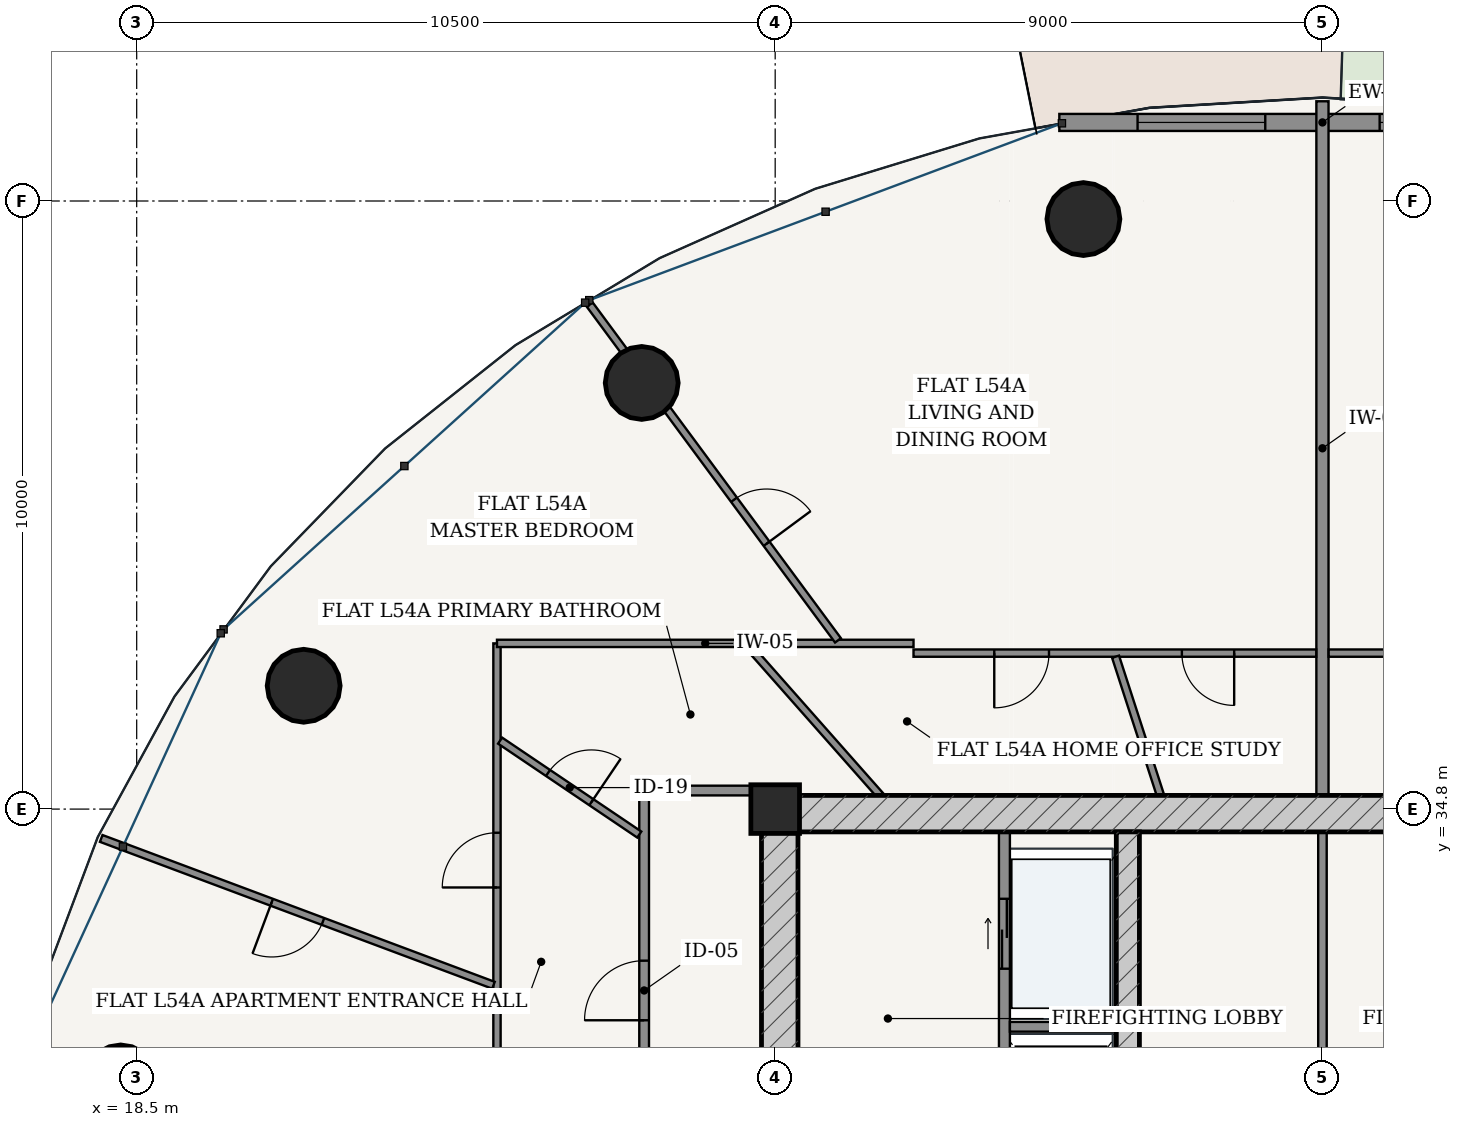
"""IFC4 building model, lengths in metres.
Left out: names, types, materials, properties, quantities, classifications, styles, units other than length and angle.
Written with IfcOpenShell. Run it as: python <this file> out.ifc"""

import sys

from ifc_helpers import new_model, si_unit, direction, frame, frame_2d, origin, origin_2d, place, context, subcontext, project, spatial, rectangle, hollow_circle, extrude, source, transform, mapped, element, fill, save


model = new_model("IFC4")
c1 = context("Model", 3, precision=1e-05, world=origin(), true_north=direction((-0.2419218956, 0.970295726276)))
c2 = subcontext(c1, "Body", "Model", "MODEL_VIEW")
j1 = project(units=[si_unit("LENGTHUNIT", "METRE"), si_unit("PLANEANGLEUNIT", "RADIAN")], contexts=[c1])
p1 = place(None, origin())
s1 = spatial("IfcSite", under=j1, at=p1, CompositionType="ELEMENT")
p2 = place(p1, origin())
s2 = spatial("IfcBuilding", under=s1, at=p2, CompositionType="ELEMENT")
p3 = place(p2, frame((0.0, 0.0, 206.0)))
s3 = spatial("IfcBuildingStorey", under=s2, at=p3, CompositionType="ELEMENT", Elevation=206.0)
p4 = place(p3, frame((29.0, 34.8, 0.0), z_axis=(0.0, 0.0, 1.0), x_axis=(1.0, 0.0, 0.0)))
e1 = element("IfcColumn", 1, at=p4, inside=s3, PredefinedType="COLUMN", context=c2, shape_type="SweptSolid", body=[
    extrude(rectangle(XDim=0.8, YDim=0.8, at=origin_2d()), origin(), (0.0, 0.0, 1.0), 3.7),
])
p5 = place(p3, frame((28.775, 34.725, 0.0), z_axis=(0.0, 0.0, 1.0), x_axis=(1.0, 0.0, 0.0)))
e2 = element("IfcWall", 2, at=p5, inside=s3, PredefinedType="SHEAR", context=c2, shape_type="SweptSolid", body=[
    extrude(rectangle(XDim=18.45, YDim=0.6, at=frame_2d((9.225, 0.0))), origin(), (0.0, 0.0, 1.0), 3.435),
])
p6 = place(p3, frame((29.075, 19.175, 0.0), z_axis=(0.0, 0.0, 1.0), x_axis=(0.0, 1.0, 0.0)))
e3 = element("IfcWall", 3, at=p6, inside=s3, PredefinedType="SHEAR", context=c2, shape_type="SweptSolid", body=[
    extrude(rectangle(XDim=15.25, YDim=0.6, at=frame_2d((7.625, 0.0))), origin(), (0.0, 0.0, 1.0), 3.435),
])
p7 = place(p6, frame((9.875, 0.0, 0.0)))
e4 = element("IfcOpeningElement", 4, at=p7, cuts=e3, PredefinedType="OPENING", context=c2, shape_type="SweptSolid", body=[
    extrude(rectangle(XDim=1.5, YDim=2.2, at=frame_2d((0.75, 1.1))), frame((0.0, 0.31, 0.0), z_axis=(0.0, -1.0, 0.0), x_axis=(1.0, 0.0, 0.0)), (0.0, 0.0, 1.0), 0.62),
])
p8 = place(p3, frame((34.8, 19.175, 0.0), z_axis=(0.0, 0.0, 1.0), x_axis=(0.0, 1.0, 0.0)))
e5 = element("IfcWall", 5, at=p8, inside=s3, PredefinedType="SHEAR", context=c2, shape_type="SweptSolid", body=[
    extrude(rectangle(XDim=15.25, YDim=0.38, at=frame_2d((7.625, 0.0))), origin(), (0.0, 0.0, 1.0), 3.435),
])
p9 = place(p8, frame((7.8, 0.0, 0.0)))
e6 = element("IfcOpeningElement", 6, at=p9, cuts=e5, PredefinedType="OPENING", context=c2, shape_type="SweptSolid", body=[
    extrude(rectangle(XDim=1.05, YDim=2.15, at=frame_2d((0.525, 1.075))), frame((0.0, 0.2, 0.0), z_axis=(0.0, -1.0, 0.0), x_axis=(1.0, 0.0, 0.0)), (0.0, 0.0, 1.0), 0.4),
])
for number, where, z_axis, x_axis in (
    (7, (34.069, 44.503, 0.0), (0.0, 0.0, 1.0), (1.0, 0.0, 0.0)),
    (8, (26.805, 41.808, 0.0), (0.0, 0.0, 1.0), (1.0, 0.0, 0.0)),
    (9, (21.246, 36.828, 0.0), (0.0, 0.0, 1.0), (1.0, 0.0, 0.0)),
    (10, (18.237, 30.321, 0.0), (0.0, 0.0, 1.0), (1.0, 0.0, 0.0)),
):
    element("IfcColumn", number, at=place(p3, frame(where, z_axis=z_axis, x_axis=x_axis)), inside=s3, PredefinedType="COLUMN", context=c2, shape_type="SweptSolid", body=[
        extrude(hollow_circle(Radius=0.6, WallThickness=0.038, at=origin_2d()), origin(), (0.0, 0.0, 1.0), 3.7),
    ])
p10 = place(p3, frame((42.327, 46.092, 0.0), z_axis=(0.0, 0.0, 1.0), x_axis=(-1.0, 0.0, 0.0)))
e11 = element("IfcWall", 11, at=p10, inside=s3, PredefinedType="SOLIDWALL", context=c2, shape_type="SweptSolid", body=[
    extrude(rectangle(XDim=8.654, YDim=0.28, at=frame_2d((4.327, 0.0))), origin(), (0.0, 0.0, 1.0), 3.435),
])
p11 = place(p10, frame((1.287, 0.0, 0.85)))
e12 = element("IfcOpeningElement", 12, at=p11, cuts=e11, PredefinedType="OPENING", context=c2, shape_type="SweptSolid", body=[
    extrude(rectangle(XDim=2.1, YDim=1.95, at=frame_2d((1.05, 0.975))), frame((0.0, 0.15, 0.0), z_axis=(0.0, -1.0, 0.0), x_axis=(1.0, 0.0, 0.0)), (0.0, 0.0, 1.0), 0.3),
])
p12 = place(p10, frame((5.268, 0.0, 0.85)))
e13 = element("IfcOpeningElement", 13, at=p12, cuts=e11, PredefinedType="OPENING", context=c2, shape_type="SweptSolid", body=[
    extrude(rectangle(XDim=2.1, YDim=1.95, at=frame_2d((1.05, 0.975))), frame((0.0, 0.15, 0.0), z_axis=(0.0, -1.0, 0.0), x_axis=(1.0, 0.0, 0.0)), (0.0, 0.0, 1.0), 0.3),
])
p13 = place(p3, frame((32.77, 28.52, 0.0), z_axis=(0.0, 0.0, 1.0), x_axis=(0.0, 1.0, 0.0)))
e14 = element("IfcWall", 14, at=p13, inside=s3, PredefinedType="PARTITIONING", context=c2, shape_type="SweptSolid", body=[
    extrude(rectangle(XDim=5.905, YDim=0.18, at=frame_2d((2.953, 0.0))), origin(), (0.0, 0.0, 1.0), 3.435),
])
p14 = place(p13, frame((3.655, 0.0, 0.0)))
e15 = element("IfcOpeningElement", 15, at=p14, cuts=e14, PredefinedType="OPENING", context=c2, shape_type="SweptSolid", body=[
    extrude(rectangle(XDim=1.15, YDim=2.2, at=frame_2d((0.575, 1.1))), frame((0.0, 0.1, 0.0), z_axis=(0.0, -1.0, 0.0), x_axis=(1.0, 0.0, 0.0)), (0.0, 0.0, 1.0), 0.2),
])
p15 = place(p13, frame((0.73, 0.0, 0.0)))
e16 = element("IfcOpeningElement", 16, at=p15, cuts=e14, PredefinedType="OPENING", context=c2, shape_type="SweptSolid", body=[
    extrude(rectangle(XDim=1.2, YDim=2.25, at=frame_2d((0.6, 1.125))), frame((0.0, 0.1, 0.0), z_axis=(0.0, -1.0, 0.0), x_axis=(1.0, 0.0, 0.0)), (0.0, 0.0, 1.0), 0.2),
])
p16 = place(p3, frame((32.86, 31.22, 0.0), z_axis=(0.0, 0.0, 1.0), x_axis=(1.0, 0.0, 0.0)))
e17 = element("IfcWall", 17, at=p16, inside=s3, PredefinedType="PARTITIONING", context=c2, shape_type="SweptSolid", body=[
    extrude(rectangle(XDim=1.75, YDim=0.16, at=frame_2d((0.875, 0.0))), origin(), (0.0, 0.0, 1.0), 3.435),
])
p17 = place(p3, frame((38.0, 28.56, 0.0), z_axis=(0.0, 0.0, 1.0), x_axis=(0.0, 1.0, 0.0)))
e18 = element("IfcWall", 18, at=p17, inside=s3, PredefinedType="PARTITIONING", context=c2, shape_type="SweptSolid", body=[
    extrude(rectangle(XDim=5.865, YDim=0.14, at=frame_2d((2.933, 0.0))), origin(), (0.0, 0.0, 1.0), 3.435),
])
p18 = place(p3, frame((26.845, 24.4, 0.0), z_axis=(0.0, 0.0, 1.0), x_axis=(0.0, 1.0, 0.0)))
e19 = element("IfcWall", 19, at=p18, inside=s3, PredefinedType="PARTITIONING", context=c2, shape_type="SweptSolid", body=[
    extrude(rectangle(XDim=10.625, YDim=0.16, at=frame_2d((5.312, 0.0))), origin(), (0.0, 0.0, 1.0), 2.951),
])
p19 = place(p18, frame((6.927, 0.0, 0.0)))
e20 = element("IfcOpeningElement", 20, at=p19, cuts=e19, PredefinedType="OPENING", context=c2, shape_type="SweptSolid", body=[
    extrude(rectangle(XDim=0.98, YDim=2.2, at=frame_2d((0.49, 1.1))), frame((0.0, 0.09, 0.0), z_axis=(0.0, -1.0, 0.0), x_axis=(1.0, 0.0, 0.0)), (0.0, 0.0, 1.0), 0.18),
])
p20 = place(p3, frame((26.845, 35.105, 0.0), z_axis=(0.0, 0.0, 1.0), x_axis=(1.0, 0.0, 0.0)))
e21 = element("IfcWall", 21, at=p20, inside=s3, PredefinedType="PARTITIONING", context=c2, shape_type="SweptSolid", body=[
    extrude(rectangle(XDim=1.93, YDim=0.16, at=frame_2d((0.965, 0.0))), origin(), (0.0, 0.0, 1.0), 3.435),
])
p21 = place(p3, frame((38.0, 35.027, 0.0), z_axis=(0.0, 0.0, 1.0), x_axis=(0.0, 1.0, 0.0)))
e22 = element("IfcWall", 22, at=p21, inside=s3, PredefinedType="PARTITIONING", context=c2, shape_type="SweptSolid", body=[
    extrude(rectangle(XDim=11.413, YDim=0.2, at=frame_2d((5.707, 0.0))), origin(), (0.0, 0.0, 1.0), 2.52),
])
p22 = place(p3, frame((24.425, 21.9, 0.0), z_axis=(0.0, 0.0, 1.0), x_axis=(0.0, 1.0, 0.0)))
e23 = element("IfcWall", 23, at=p22, inside=s3, PredefinedType="PARTITIONING", context=c2, shape_type="SweptSolid", body=[
    extrude(rectangle(XDim=15.625, YDim=0.12, at=frame_2d((7.812, 0.0))), origin(), (0.0, 0.0, 1.0), 2.951),
])
p23 = place(p22, frame((11.611, 0.0, 0.0)))
e24 = element("IfcOpeningElement", 24, at=p23, cuts=e23, PredefinedType="OPENING", context=c2, shape_type="SweptSolid", body=[
    extrude(rectangle(XDim=0.9, YDim=2.15, at=frame_2d((0.45, 1.075))), frame((0.0, 0.07, 0.0), z_axis=(0.0, -1.0, 0.0), x_axis=(1.0, 0.0, 0.0)), (0.0, 0.0, 1.0), 0.14),
])
p24 = place(p3, frame((24.425, 37.525, 0.0), z_axis=(0.0, 0.0, 1.0), x_axis=(1.0, 0.0, 0.0)))
e25 = element("IfcWall", 25, at=p24, inside=s3, PredefinedType="PARTITIONING", context=c2, shape_type="SweptSolid", body=[
    extrude(rectangle(XDim=6.85, YDim=0.12, at=frame_2d((3.425, 0.0))), origin(), (0.0, 0.0, 1.0), 2.951),
])
p25 = place(p3, frame((31.275, 37.365, 0.0), z_axis=(0.0, 0.0, 1.0), x_axis=(1.0, 0.0, 0.0)))
e26 = element("IfcWall", 26, at=p25, inside=s3, PredefinedType="PARTITIONING", context=c2, shape_type="SweptSolid", body=[
    extrude(rectangle(XDim=6.623, YDim=0.12, at=frame_2d((3.312, 0.0))), origin(), (0.0, 0.0, 1.0), 2.951),
])
p26 = place(p25, frame((4.413, 0.0, 0.0)))
e27 = element("IfcOpeningElement", 27, at=p26, cuts=e26, PredefinedType="OPENING", context=c2, shape_type="SweptSolid", body=[
    extrude(rectangle(XDim=0.86, YDim=2.15, at=frame_2d((0.43, 1.075))), frame((0.0, 0.07, 0.0), z_axis=(0.0, -1.0, 0.0), x_axis=(1.0, 0.0, 0.0)), (0.0, 0.0, 1.0), 0.14),
])
p27 = place(p25, frame((1.328, 0.0, 0.0)))
e28 = element("IfcOpeningElement", 28, at=p27, cuts=e26, PredefinedType="OPENING", context=c2, shape_type="SweptSolid", body=[
    extrude(rectangle(XDim=0.9, YDim=2.15, at=frame_2d((0.45, 1.075))), frame((0.0, 0.07, 0.0), z_axis=(0.0, -1.0, 0.0), x_axis=(1.0, 0.0, 0.0)), (0.0, 0.0, 1.0), 0.14),
])
p28 = place(p3, frame((30.033, 37.575, 0.0), z_axis=(0.0, 0.0, 1.0), x_axis=(-0.59452500855, 0.804077119565, 0.0)))
e29 = element("IfcWall", 29, at=p28, inside=s3, PredefinedType="PARTITIONING", context=c2, shape_type="SweptSolid", body=[
    extrude(rectangle(XDim=6.867, YDim=0.12, at=frame_2d((3.434, 0.0))), origin(), (0.0, 0.0, 1.0), 2.951),
])
p29 = place(p28, frame((1.976, 0.0, 0.0)))
e30 = element("IfcOpeningElement", 30, at=p29, cuts=e29, PredefinedType="OPENING", context=c2, shape_type="SweptSolid", body=[
    extrude(rectangle(XDim=0.9, YDim=2.15, at=frame_2d((0.45, 1.075))), frame((0.0, 0.07, 0.0), z_axis=(0.0, -1.0, 0.0), x_axis=(1.0, 0.0, 0.0)), (0.0, 0.0, 1.0), 0.14),
])
p30 = place(p3, frame((24.367, 31.903, 0.0), z_axis=(0.0, 0.0, 1.0), x_axis=(-0.936544604529, 0.350548432785, 0.0)))
e31 = element("IfcWall", 31, at=p30, inside=s3, PredefinedType="PARTITIONING", context=c2, shape_type="SweptSolid", body=[
    extrude(rectangle(XDim=6.887, YDim=0.12, at=frame_2d((3.444, 0.0))), origin(), (0.0, 0.0, 1.0), 2.951),
])
p31 = place(p30, frame((2.994, 0.0, 0.0)))
e32 = element("IfcOpeningElement", 32, at=p31, cuts=e31, PredefinedType="OPENING", context=c2, shape_type="SweptSolid", body=[
    extrude(rectangle(XDim=0.9, YDim=2.15, at=frame_2d((0.45, 1.075))), frame((0.0, 0.07, 0.0), z_axis=(0.0, -1.0, 0.0), x_axis=(1.0, 0.0, 0.0)), (0.0, 0.0, 1.0), 0.14),
])
p32 = place(p3, frame((35.336, 35.027, 0.0), z_axis=(0.0, 0.0, 1.0), x_axis=(-0.308083476138, 0.951359328398, 0.0)))
e33 = element("IfcWall", 33, at=p32, inside=s3, PredefinedType="PARTITIONING", context=c2, shape_type="SweptSolid", body=[
    extrude(rectangle(XDim=2.396, YDim=0.12, at=frame_2d((1.198, 0.0))), origin(), (0.0, 0.0, 1.0), 2.52),
])
p33 = place(p3, frame((30.726, 35.027, 0.0), z_axis=(0.0, 0.0, 1.0), x_axis=(-0.662398427862, 0.749151735475, 0.0)))
e34 = element("IfcWall", 34, at=p33, inside=s3, PredefinedType="PARTITIONING", context=c2, shape_type="SweptSolid", body=[
    extrude(rectangle(XDim=3.273, YDim=0.12, at=frame_2d((1.636, 0.0))), origin(), (0.0, 0.0, 1.0), 3.435),
])
p34 = place(p3, frame((26.765, 34.381, 0.0), z_axis=(0.0, 0.0, 1.0), x_axis=(-0.828908126494, 0.55938476725, 0.0)))
e35 = element("IfcWall", 35, at=p34, inside=s3, PredefinedType="PARTITIONING", context=c2, shape_type="SweptSolid", body=[
    extrude(rectangle(XDim=2.761, YDim=0.12, at=frame_2d((1.38, 0.0))), origin(), (0.0, 0.0, 1.0), 3.11),
])
p35 = place(p34, frame((0.95, 0.0, 0.0)))
e36 = element("IfcOpeningElement", 36, at=p35, cuts=e35, PredefinedType="OPENING", context=c2, shape_type="SweptSolid", body=[
    extrude(rectangle(XDim=0.86, YDim=2.15, at=frame_2d((0.43, 1.075))), frame((0.0, 0.07, 0.0), z_axis=(0.0, -1.0, 0.0), x_axis=(1.0, 0.0, 0.0)), (0.0, 0.0, 1.0), 0.14),
])
p36 = place(p3, frame((38.102, 37.365, 0.0), z_axis=(0.0, 0.0, 1.0), x_axis=(1.0, 0.0, 0.0)))
e37 = element("IfcWall", 37, at=p36, inside=s3, PredefinedType="PARTITIONING", context=c2, shape_type="SweptSolid", body=[
    extrude(rectangle(XDim=6.623, YDim=0.12, at=frame_2d((3.312, 0.0))), origin(), (0.0, 0.0, 1.0), 2.951),
])
p37 = place(p36, frame((5.06, 0.0, 0.0)))
e38 = element("IfcOpeningElement", 38, at=p37, cuts=e37, PredefinedType="OPENING", context=c2, shape_type="SweptSolid", body=[
    extrude(rectangle(XDim=0.9, YDim=2.15, at=frame_2d((0.45, 1.075))), frame((0.0, 0.07, 0.0), z_axis=(0.0, -1.0, 0.0), x_axis=(1.0, 0.0, 0.0)), (0.0, 0.0, 1.0), 0.14),
])
p38 = place(p36, frame((2.04, 0.0, 0.0)))
e39 = element("IfcOpeningElement", 39, at=p38, cuts=e37, PredefinedType="OPENING", context=c2, shape_type="SweptSolid", body=[
    extrude(rectangle(XDim=0.9, YDim=2.15, at=frame_2d((0.45, 1.075))), frame((0.0, 0.07, 0.0), z_axis=(0.0, -1.0, 0.0), x_axis=(1.0, 0.0, 0.0)), (0.0, 0.0, 1.0), 0.14),
])
m1 = source(origin(), c2, "Body", "SweptSolid", [
    extrude(rectangle(XDim=2.1, YDim=1.95, at=frame_2d((1.05, 0.975))), frame((0.0, 0.03, 0.0), z_axis=(0.0, -1.0, 0.0), x_axis=(1.0, 0.0, 0.0)), (0.0, 0.0, 1.0), 0.06),
])
p39 = place(p11, origin())
e40 = element("IfcWindow", 40, at=p39, inside=s3, PartitioningType="SINGLE_PANEL", PredefinedType="WINDOW", context=c2, shape_type="MappedRepresentation", body=[
    mapped(m1, transform((0.0, 0.0, 0.0), scale=1.0)),
])
fill(e12, e40)
p40 = place(p12, origin())
e41 = element("IfcWindow", 41, at=p40, inside=s3, PartitioningType="SINGLE_PANEL", PredefinedType="WINDOW", context=c2, shape_type="MappedRepresentation", body=[
    mapped(m1, transform((0.0, 0.0, 0.0), scale=1.0)),
])
fill(e13, e41)
m2 = source(origin(), c2, "Body", "SweptSolid", [
    extrude(rectangle(XDim=1.15, YDim=2.2, at=frame_2d((0.575, 1.1))), frame((0.0, 0.025, 0.0), z_axis=(0.0, -1.0, 0.0), x_axis=(1.0, 0.0, 0.0)), (0.0, 0.0, 1.0), 0.05),
])
p41 = place(p14, origin())
e42 = element("IfcDoor", 42, at=p41, inside=s3, OperationType="DOUBLE_DOOR_SLIDING", PredefinedType="DOOR", context=c2, shape_type="MappedRepresentation", body=[
    mapped(m2, transform((0.0, 0.0, 0.0), scale=1.0)),
])
fill(e15, e42)
m3 = source(origin(), c2, "Body", "SweptSolid", [
    extrude(rectangle(XDim=0.98, YDim=2.2, at=frame_2d((0.49, 1.1))), frame((0.0, 0.025, 0.0), z_axis=(0.0, -1.0, 0.0), x_axis=(1.0, 0.0, 0.0)), (0.0, 0.0, 1.0), 0.05),
])
p42 = place(p19, origin())
e43 = element("IfcDoor", 43, at=p42, inside=s3, OperationType="SINGLE_SWING_LEFT", PredefinedType="DOOR", context=c2, shape_type="MappedRepresentation", body=[
    mapped(m3, transform((0.0, 0.0, 0.0), scale=1.0)),
])
fill(e20, e43)
m4 = source(origin(), c2, "Body", "SweptSolid", [
    extrude(rectangle(XDim=0.86, YDim=2.15, at=frame_2d((0.43, 1.075))), frame((0.0, 0.025, 0.0), z_axis=(0.0, -1.0, 0.0), x_axis=(1.0, 0.0, 0.0)), (0.0, 0.0, 1.0), 0.05),
])
p43 = place(p35, frame((0.86, 0.0, 0.0), z_axis=(0.0, 0.0, 1.0), x_axis=(-1.0, 0.0, 0.0)))
e44 = element("IfcDoor", 44, at=p43, inside=s3, OperationType="SINGLE_SWING_RIGHT", PredefinedType="DOOR", context=c2, shape_type="MappedRepresentation", body=[
    mapped(m4, transform((0.0, 0.0, 0.0), scale=1.0)),
])
fill(e36, e44)
m5 = source(origin(), c2, "Body", "SweptSolid", [
    extrude(rectangle(XDim=0.9, YDim=2.15, at=frame_2d((0.45, 1.075))), frame((0.0, 0.025, 0.0), z_axis=(0.0, -1.0, 0.0), x_axis=(1.0, 0.0, 0.0)), (0.0, 0.0, 1.0), 0.05),
])
p44 = place(p23, origin())
e45 = element("IfcDoor", 45, at=p44, inside=s3, OperationType="SINGLE_SWING_LEFT", PredefinedType="DOOR", context=c2, shape_type="MappedRepresentation", body=[
    mapped(m5, transform((0.0, 0.0, 0.0), scale=1.0)),
])
fill(e24, e45)
p45 = place(p31, origin())
e46 = element("IfcDoor", 46, at=p45, inside=s3, OperationType="SINGLE_SWING_RIGHT", PredefinedType="DOOR", context=c2, shape_type="MappedRepresentation", body=[
    mapped(m5, transform((0.0, 0.0, 0.0), scale=1.0)),
])
fill(e32, e46)
p46 = place(p29, frame((0.9, 0.0, 0.0), z_axis=(0.0, 0.0, 1.0), x_axis=(-1.0, 0.0, 0.0)))
e47 = element("IfcDoor", 47, at=p46, inside=s3, OperationType="SINGLE_SWING_RIGHT", PredefinedType="DOOR", context=c2, shape_type="MappedRepresentation", body=[
    mapped(m5, transform((0.0, 0.0, 0.0), scale=1.0)),
])
fill(e30, e47)
p47 = place(p26, frame((0.86, 0.0, 0.0), z_axis=(0.0, 0.0, 1.0), x_axis=(-1.0, 0.0, 0.0)))
e48 = element("IfcDoor", 48, at=p47, inside=s3, OperationType="SINGLE_SWING_LEFT", PredefinedType="DOOR", context=c2, shape_type="MappedRepresentation", body=[
    mapped(m4, transform((0.0, 0.0, 0.0), scale=1.0)),
])
fill(e27, e48)
p48 = place(p27, frame((0.9, 0.0, 0.0), z_axis=(0.0, 0.0, 1.0), x_axis=(-1.0, 0.0, 0.0)))
e49 = element("IfcDoor", 49, at=p48, inside=s3, OperationType="SINGLE_SWING_RIGHT", PredefinedType="DOOR", context=c2, shape_type="MappedRepresentation", body=[
    mapped(m5, transform((0.0, 0.0, 0.0), scale=1.0)),
])
fill(e28, e49)
save(model, sys.argv[1])
